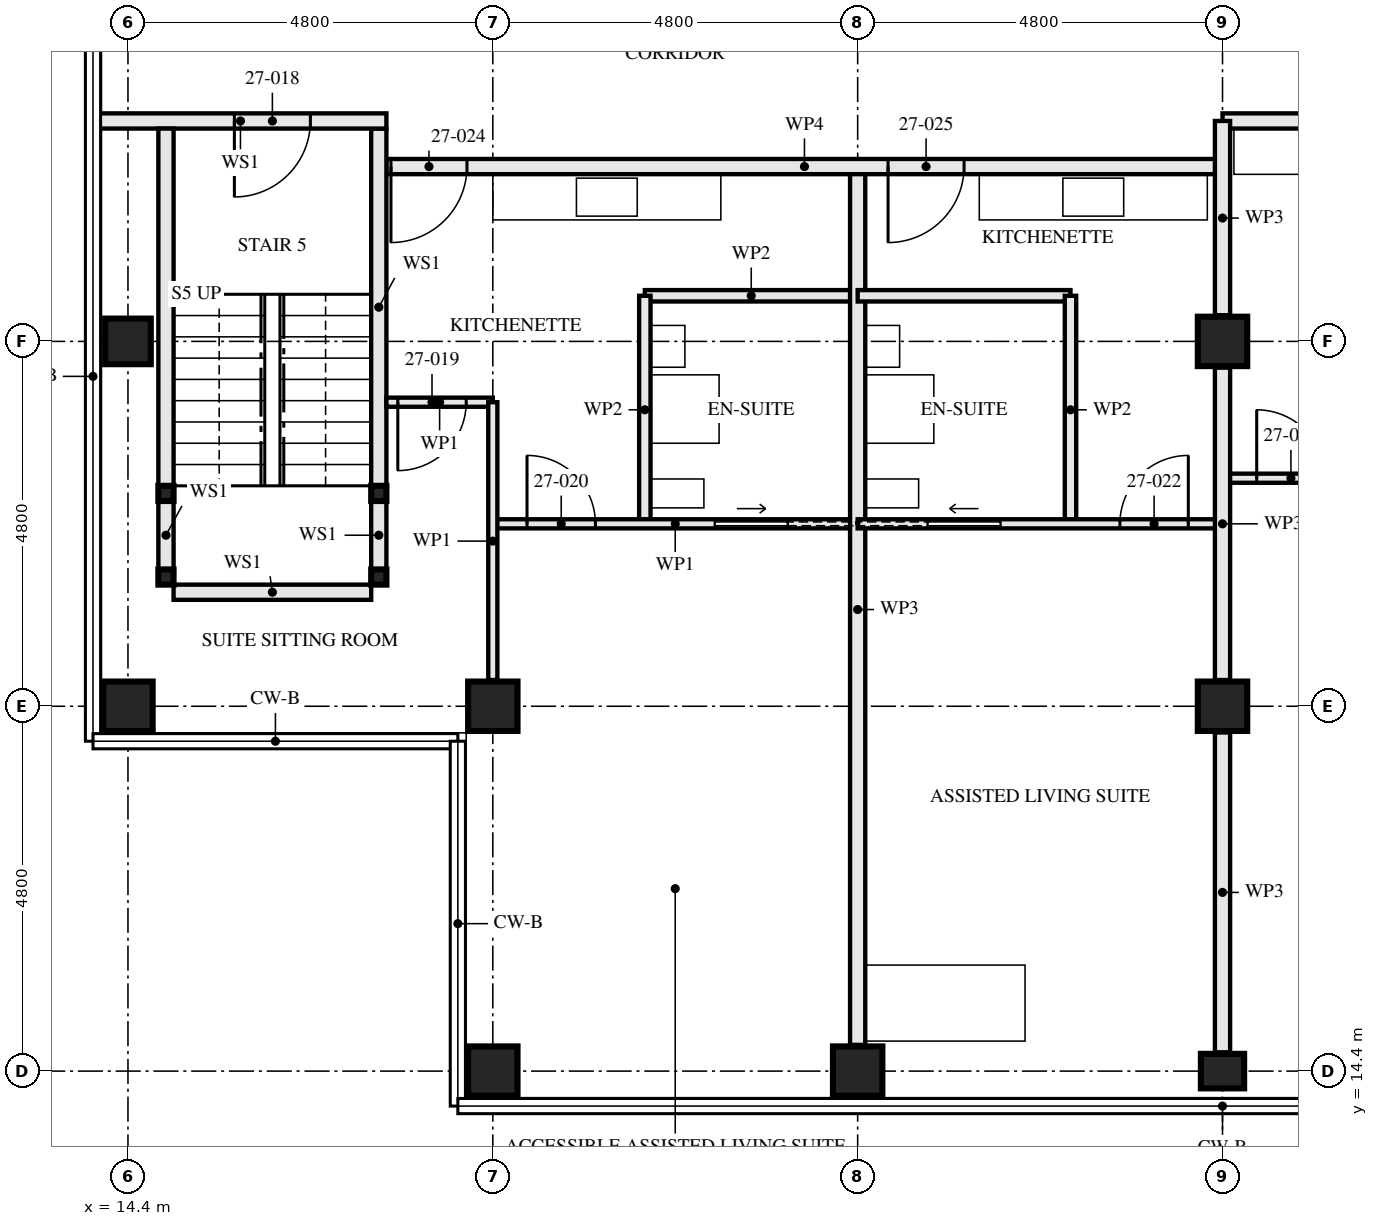
"""IFC4 building model, lengths in metres.
Left out: names, types, materials, properties, quantities, classifications, styles, units other than length and angle.
Written with IfcOpenShell. Run it as: python <this file> out.ifc"""

import sys

from ifc_helpers import new_model, si_unit, direction, frame, frame_2d, origin, origin_2d, place, context, subcontext, project, spatial, rectangle, hollow_rectangle, i_section, extrude, element, fill, save


model = new_model("IFC4")
c1 = context("Model", 3, precision=1e-05, world=origin(), true_north=direction((0.0, 1.0)))
c2 = subcontext(c1, "Body", "Model", "MODEL_VIEW")
j1 = project(units=[si_unit("LENGTHUNIT", "METRE"), si_unit("PLANEANGLEUNIT", "RADIAN")], contexts=[c1])
p1 = place(None, origin())
s1 = spatial("IfcSite", under=j1, at=p1, CompositionType="ELEMENT")
p2 = place(p1, origin())
s2 = spatial("IfcBuilding", under=s1, at=p2, CompositionType="ELEMENT")
p3 = place(p2, frame((0.0, 0.0, 101.5)))
s3 = spatial("IfcBuildingStorey", under=s2, at=p3, CompositionType="ELEMENT", Elevation=101.5)
p4 = place(p3, frame((14.4, 19.2, 0.0), z_axis=(0.0, 0.0, 1.0), x_axis=(0.0, 1.0, 0.0)))
e1 = element("IfcColumn", 1, at=p4, inside=s3, PredefinedType="COLUMN", context=c2, shape_type="SweptSolid", body=[
    extrude(hollow_rectangle(XDim=0.65, YDim=0.65, WallThickness=0.08, at=origin_2d()), origin(), (0.0, 0.0, 1.0), 3.5),
])
p5 = place(p3, frame((14.4, 24.0, 0.0), z_axis=(0.0, 0.0, 1.0), x_axis=(1.0, 0.0, 0.0)))
e2 = element("IfcColumn", 2, at=p5, inside=s3, PredefinedType="COLUMN", context=c2, shape_type="SweptSolid", body=[
    extrude(hollow_rectangle(XDim=0.6, YDim=0.6, WallThickness=0.08, at=origin_2d()), origin(), (0.0, 0.0, 1.0), 3.5),
])
for number, where, z_axis, x_axis in (
    (3, (19.2, 14.4, 0.0), (0.0, 0.0, 1.0), (0.0, 1.0, 0.0)),
    (4, (19.2, 19.2, 0.0), (0.0, 0.0, 1.0), (0.0, 1.0, 0.0)),
    (5, (24.0, 14.4, 0.0), (0.0, 0.0, 1.0), (0.0, 1.0, 0.0)),
):
    element("IfcColumn", number, at=place(p3, frame(where, z_axis=z_axis, x_axis=x_axis)), inside=s3, PredefinedType="COLUMN", context=c2, shape_type="SweptSolid", body=[
        extrude(hollow_rectangle(XDim=0.65, YDim=0.65, WallThickness=0.08, at=origin_2d()), origin(), (0.0, 0.0, 1.0), 3.5),
    ])
p6 = place(p3, frame((28.8, 14.4, 0.0), z_axis=(0.0, 0.0, 1.0), x_axis=(0.0, 1.0, 0.0)))
e6 = element("IfcColumn", 6, at=p6, inside=s3, PredefinedType="COLUMN", context=c2, shape_type="SweptSolid", body=[
    extrude(i_section(OverallWidth=0.454, OverallDepth=0.569, WebThickness=0.078, FlangeThickness=0.125, FilletRadius=0.015, at=origin_2d()), origin(), (0.0, 0.0, 1.0), 3.5),
])
for number, where, z_axis, x_axis in (
    (7, (28.8, 19.2, 0.0), (0.0, 0.0, 1.0), (1.0, 0.0, 0.0)),
    (8, (28.8, 24.0, 0.0), (0.0, 0.0, 1.0), (1.0, 0.0, 0.0)),
):
    element("IfcColumn", number, at=place(p3, frame(where, z_axis=z_axis, x_axis=x_axis)), inside=s3, PredefinedType="COLUMN", context=c2, shape_type="SweptSolid", body=[
        extrude(hollow_rectangle(XDim=0.65, YDim=0.65, WallThickness=0.05, at=origin_2d()), origin(), (0.0, 0.0, 1.0), 3.5),
    ])
for number, where, z_axis, x_axis in (
    (9, (14.9, 20.9, 0.0), (0.0, 0.0, 1.0), (1.0, 0.0, 0.0)),
    (10, (17.7, 20.9, 0.0), (0.0, 0.0, 1.0), (1.0, 0.0, 0.0)),
    (11, (14.9, 22.0, 0.0), (0.0, 0.0, 1.0), (1.0, 0.0, 0.0)),
    (12, (17.7, 22.0, 0.0), (0.0, 0.0, 1.0), (1.0, 0.0, 0.0)),
):
    element("IfcColumn", number, at=place(p3, frame(where, z_axis=z_axis, x_axis=x_axis)), inside=s3, PredefinedType="COLUMN", context=c2, shape_type="SweptSolid", body=[
        extrude(hollow_rectangle(XDim=0.2, YDim=0.2, WallThickness=0.008, at=origin_2d()), origin(), (0.0, 0.0, 1.0), 3.33),
    ])
p7 = place(p3, frame((14.9, 21.0, 0.0), z_axis=(0.0, 0.0, 1.0), x_axis=(0.0, 1.0, 0.0)))
e13 = element("IfcWall", 13, at=p7, inside=s3, PredefinedType="SOLIDWALL", context=c2, shape_type="SweptSolid", body=[
    extrude(rectangle(XDim=0.9, YDim=0.2, at=frame_2d((0.45, 0.0))), origin(), (0.0, 0.0, 1.0), 2.99),
])
p8 = place(p3, frame((14.9, 22.1, 0.0), z_axis=(0.0, 0.0, 1.0), x_axis=(0.0, 1.0, 0.0)))
e14 = element("IfcWall", 14, at=p8, inside=s3, PredefinedType="SOLIDWALL", context=c2, shape_type="SweptSolid", body=[
    extrude(rectangle(XDim=4.7, YDim=0.2, at=frame_2d((2.35, 0.0))), origin(), (0.0, 0.0, 1.0), 2.99),
])
p9 = place(p3, frame((17.7, 21.0, 0.0), z_axis=(0.0, 0.0, 1.0), x_axis=(0.0, 1.0, 0.0)))
e15 = element("IfcWall", 15, at=p9, inside=s3, PredefinedType="SOLIDWALL", context=c2, shape_type="SweptSolid", body=[
    extrude(rectangle(XDim=0.9, YDim=0.2, at=frame_2d((0.45, 0.0))), origin(), (0.0, 0.0, 1.0), 2.99),
])
p10 = place(p3, frame((17.7, 22.1, 0.0), z_axis=(0.0, 0.0, 1.0), x_axis=(0.0, 1.0, 0.0)))
e16 = element("IfcWall", 16, at=p10, inside=s3, PredefinedType="SOLIDWALL", context=c2, shape_type="SweptSolid", body=[
    extrude(rectangle(XDim=4.7, YDim=0.2, at=frame_2d((2.35, 0.0))), origin(), (0.0, 0.0, 1.0), 2.99),
])
p11 = place(p3, frame((15.0, 20.7, 0.0), z_axis=(0.0, 0.0, 1.0), x_axis=(1.0, 0.0, 0.0)))
e17 = element("IfcWall", 17, at=p11, inside=s3, PredefinedType="SOLIDWALL", context=c2, shape_type="SweptSolid", body=[
    extrude(rectangle(XDim=2.6, YDim=0.2, at=frame_2d((1.3, 0.0))), origin(), (0.0, 0.0, 1.0), 3.33),
])
p12 = place(p3, frame((13.96, 26.9, 0.0), z_axis=(0.0, 0.0, 1.0), x_axis=(1.0, 0.0, 0.0)))
e18 = element("IfcWall", 18, at=p12, inside=s3, PredefinedType="SOLIDWALL", context=c2, shape_type="SweptSolid", body=[
    extrude(rectangle(XDim=3.84, YDim=0.2, at=frame_2d((1.92, 0.0))), origin(), (0.0, 0.0, 1.0), 2.32),
])
p13 = place(p12, frame((1.84, 0.0, 0.0)))
e19 = element("IfcOpeningElement", 19, at=p13, cuts=e18, PredefinedType="OPENING", context=c2, shape_type="SweptSolid", body=[
    extrude(rectangle(XDim=1.0, YDim=2.1, at=frame_2d((0.5, 1.05))), frame((0.0, 0.111, 0.0), z_axis=(0.0, -1.0, 0.0), x_axis=(1.0, 0.0, 0.0)), (0.0, 0.0, 1.0), 0.221),
])
p14 = place(p3, frame((21.2, 21.6, 0.0), z_axis=(0.0, 0.0, 1.0), x_axis=(0.0, 1.0, 0.0)))
e20 = element("IfcWall", 20, at=p14, inside=s3, PredefinedType="PARTITIONING", context=c2, shape_type="SweptSolid", body=[
    extrude(rectangle(XDim=3.0, YDim=0.15, at=frame_2d((1.5, 0.0))), origin(), (0.0, 0.0, 1.0), 2.55),
])
p15 = place(p3, frame((21.2, 24.6, 0.0), z_axis=(0.0, 0.0, 1.0), x_axis=(1.0, 0.0, 0.0)))
e21 = element("IfcWall", 21, at=p15, inside=s3, PredefinedType="PARTITIONING", context=c2, shape_type="SweptSolid", body=[
    extrude(rectangle(XDim=2.8, YDim=0.15, at=frame_2d((1.4, 0.0))), origin(), (0.0, 0.0, 1.0), 3.33),
])
p16 = place(p3, frame((17.8, 23.2, 0.0), z_axis=(0.0, 0.0, 1.0), x_axis=(1.0, 0.0, 0.0)))
e22 = element("IfcWall", 22, at=p16, inside=s3, PredefinedType="PARTITIONING", context=c2, shape_type="SweptSolid", body=[
    extrude(rectangle(XDim=1.4, YDim=0.12, at=frame_2d((0.7, 0.0))), origin(), (0.0, 0.0, 1.0), 3.33),
])
p17 = place(p16, frame((0.15, 0.0, 0.0)))
e23 = element("IfcOpeningElement", 23, at=p17, cuts=e22, PredefinedType="OPENING", context=c2, shape_type="SweptSolid", body=[
    extrude(rectangle(XDim=0.9, YDim=2.1, at=frame_2d((0.45, 1.05))), frame((0.0, 0.071, 0.0), z_axis=(0.0, -1.0, 0.0), x_axis=(1.0, 0.0, 0.0)), (0.0, 0.0, 1.0), 0.141),
])
p18 = place(p3, frame((19.2, 21.6, 0.0), z_axis=(0.0, 0.0, 1.0), x_axis=(1.0, 0.0, 0.0)))
e24 = element("IfcWall", 24, at=p18, inside=s3, PredefinedType="PARTITIONING", context=c2, shape_type="SweptSolid", body=[
    extrude(rectangle(XDim=4.8, YDim=0.12, at=frame_2d((2.4, 0.0))), origin(), (0.0, 0.0, 1.0), 3.33),
])
p19 = place(p18, frame((0.45, 0.0, 0.0)))
e25 = element("IfcOpeningElement", 25, at=p19, cuts=e24, PredefinedType="OPENING", context=c2, shape_type="SweptSolid", body=[
    extrude(rectangle(XDim=0.9, YDim=2.1, at=frame_2d((0.45, 1.05))), frame((0.0, 0.071, 0.0), z_axis=(0.0, -1.0, 0.0), x_axis=(1.0, 0.0, 0.0)), (0.0, 0.0, 1.0), 0.141),
])
p20 = place(p18, frame((2.925, 0.0, 0.0)))
e26 = element("IfcOpeningElement", 26, at=p20, cuts=e24, PredefinedType="OPENING", context=c2, shape_type="SweptSolid", body=[
    extrude(rectangle(XDim=0.95, YDim=2.1, at=frame_2d((0.475, 1.05))), frame((0.0, 0.071, 0.0), z_axis=(0.0, -1.0, 0.0), x_axis=(1.0, 0.0, 0.0)), (0.0, 0.0, 1.0), 0.141),
])
p21 = place(p3, frame((19.2, 19.545, 0.0), z_axis=(0.0, 0.0, 1.0), x_axis=(0.0, 1.0, 0.0)))
e27 = element("IfcWall", 27, at=p21, inside=s3, PredefinedType="PARTITIONING", context=c2, shape_type="SweptSolid", body=[
    extrude(rectangle(XDim=3.655, YDim=0.12, at=frame_2d((1.828, 0.0))), origin(), (0.0, 0.0, 1.0), 2.55),
])
p22 = place(p3, frame((24.0, 14.745, 0.0), z_axis=(0.0, 0.0, 1.0), x_axis=(0.0, 1.0, 0.0)))
e28 = element("IfcWall", 28, at=p22, inside=s3, PredefinedType="PARTITIONING", context=c2, shape_type="SweptSolid", body=[
    extrude(rectangle(XDim=11.455, YDim=0.2, at=frame_2d((5.728, 0.0))), origin(), (0.0, 0.0, 1.0), 2.55),
])
p23 = place(p3, frame((26.8, 21.6, 0.0), z_axis=(0.0, 0.0, 1.0), x_axis=(0.0, 1.0, 0.0)))
e29 = element("IfcWall", 29, at=p23, inside=s3, PredefinedType="PARTITIONING", context=c2, shape_type="SweptSolid", body=[
    extrude(rectangle(XDim=3.0, YDim=0.15, at=frame_2d((1.5, 0.0))), origin(), (0.0, 0.0, 1.0), 2.55),
])
p24 = place(p3, frame((24.0, 24.6, 0.0), z_axis=(0.0, 0.0, 1.0), x_axis=(1.0, 0.0, 0.0)))
e30 = element("IfcWall", 30, at=p24, inside=s3, PredefinedType="PARTITIONING", context=c2, shape_type="SweptSolid", body=[
    extrude(rectangle(XDim=2.8, YDim=0.15, at=frame_2d((1.4, 0.0))), origin(), (0.0, 0.0, 1.0), 3.33),
])
p25 = place(p3, frame((24.0, 21.6, 0.0), z_axis=(0.0, 0.0, 1.0), x_axis=(1.0, 0.0, 0.0)))
e31 = element("IfcWall", 31, at=p25, inside=s3, PredefinedType="PARTITIONING", context=c2, shape_type="SweptSolid", body=[
    extrude(rectangle(XDim=4.8, YDim=0.12, at=frame_2d((2.4, 0.0))), origin(), (0.0, 0.0, 1.0), 3.33),
])
p26 = place(p25, frame((3.45, 0.0, 0.0)))
e32 = element("IfcOpeningElement", 32, at=p26, cuts=e31, PredefinedType="OPENING", context=c2, shape_type="SweptSolid", body=[
    extrude(rectangle(XDim=0.9, YDim=2.1, at=frame_2d((0.45, 1.05))), frame((0.0, 0.071, 0.0), z_axis=(0.0, -1.0, 0.0), x_axis=(1.0, 0.0, 0.0)), (0.0, 0.0, 1.0), 0.141),
])
p27 = place(p25, frame((0.925, 0.0, 0.0)))
e33 = element("IfcOpeningElement", 33, at=p27, cuts=e31, PredefinedType="OPENING", context=c2, shape_type="SweptSolid", body=[
    extrude(rectangle(XDim=0.95, YDim=2.1, at=frame_2d((0.475, 1.05))), frame((0.0, 0.071, 0.0), z_axis=(0.0, -1.0, 0.0), x_axis=(1.0, 0.0, 0.0)), (0.0, 0.0, 1.0), 0.141),
])
p28 = place(p3, frame((17.8, 26.3, 0.0), z_axis=(0.0, 0.0, 1.0), x_axis=(1.0, 0.0, 0.0)))
e34 = element("IfcWall", 34, at=p28, inside=s3, PredefinedType="PARTITIONING", context=c2, shape_type="SweptSolid", body=[
    extrude(rectangle(XDim=11.0, YDim=0.2, at=frame_2d((5.5, 0.0))), origin(), (0.0, 0.0, 1.0), 2.55),
])
p29 = place(p28, frame((0.06, 0.0, 0.0)))
e35 = element("IfcOpeningElement", 35, at=p29, cuts=e34, PredefinedType="OPENING", context=c2, shape_type="SweptSolid", body=[
    extrude(rectangle(XDim=1.0, YDim=2.1, at=frame_2d((0.5, 1.05))), frame((0.0, 0.111, 0.0), z_axis=(0.0, -1.0, 0.0), x_axis=(1.0, 0.0, 0.0)), (0.0, 0.0, 1.0), 0.221),
])
p30 = place(p28, frame((6.6, 0.0, 0.0)))
e36 = element("IfcOpeningElement", 36, at=p30, cuts=e34, PredefinedType="OPENING", context=c2, shape_type="SweptSolid", body=[
    extrude(rectangle(XDim=1.0, YDim=2.1, at=frame_2d((0.5, 1.05))), frame((0.0, 0.111, 0.0), z_axis=(0.0, -1.0, 0.0), x_axis=(1.0, 0.0, 0.0)), (0.0, 0.0, 1.0), 0.221),
])
p31 = place(p3, frame((28.8, 22.2, 0.0), z_axis=(0.0, 0.0, 1.0), x_axis=(1.0, 0.0, 0.0)))
e37 = element("IfcWall", 37, at=p31, inside=s3, PredefinedType="PARTITIONING", context=c2, shape_type="SweptSolid", body=[
    extrude(rectangle(XDim=4.8, YDim=0.12, at=frame_2d((2.4, 0.0))), origin(), (0.0, 0.0, 1.0), 3.33),
])
p32 = place(p31, frame((0.45, 0.0, 0.0)))
e38 = element("IfcOpeningElement", 38, at=p32, cuts=e37, PredefinedType="OPENING", context=c2, shape_type="SweptSolid", body=[
    extrude(rectangle(XDim=0.9, YDim=2.1, at=frame_2d((0.45, 1.05))), frame((0.0, 0.071, 0.0), z_axis=(0.0, -1.0, 0.0), x_axis=(1.0, 0.0, 0.0)), (0.0, 0.0, 1.0), 0.141),
])
p33 = place(p3, frame((28.8, 26.9, 0.0), z_axis=(0.0, 0.0, 1.0), x_axis=(1.0, 0.0, 0.0)))
e39 = element("IfcWall", 39, at=p33, inside=s3, PredefinedType="PARTITIONING", context=c2, shape_type="SweptSolid", body=[
    extrude(rectangle(XDim=9.6, YDim=0.2, at=frame_2d((4.8, 0.0))), origin(), (0.0, 0.0, 1.0), 3.33),
])
p34 = place(p33, frame((5.2, 0.0, 0.0)))
e40 = element("IfcOpeningElement", 40, at=p34, cuts=e39, PredefinedType="OPENING", context=c2, shape_type="SweptSolid", body=[
    extrude(rectangle(XDim=1.0, YDim=2.1, at=frame_2d((0.5, 1.05))), frame((0.0, 0.111, 0.0), z_axis=(0.0, -1.0, 0.0), x_axis=(1.0, 0.0, 0.0)), (0.0, 0.0, 1.0), 0.221),
])
p35 = place(p3, frame((28.8, 14.647, 0.0), z_axis=(0.0, 0.0, 1.0), x_axis=(0.0, 1.0, 0.0)))
e41 = element("IfcWall", 41, at=p35, inside=s3, PredefinedType="PARTITIONING", context=c2, shape_type="SweptSolid", body=[
    extrude(rectangle(XDim=4.208, YDim=0.2, at=frame_2d((2.104, 0.0))), origin(), (0.0, 0.0, 1.0), 2.32),
])
p36 = place(p3, frame((28.8, 19.545, 0.0), z_axis=(0.0, 0.0, 1.0), x_axis=(0.0, 1.0, 0.0)))
e42 = element("IfcWall", 42, at=p36, inside=s3, PredefinedType="PARTITIONING", context=c2, shape_type="SweptSolid", body=[
    extrude(rectangle(XDim=4.11, YDim=0.2, at=frame_2d((2.055, 0.0))), origin(), (0.0, 0.0, 1.0), 2.32),
])
p37 = place(p3, frame((28.8, 24.345, 0.0), z_axis=(0.0, 0.0, 1.0), x_axis=(0.0, 1.0, 0.0)))
e43 = element("IfcWall", 43, at=p37, inside=s3, PredefinedType="PARTITIONING", context=c2, shape_type="SweptSolid", body=[
    extrude(rectangle(XDim=2.555, YDim=0.2, at=frame_2d((1.277, 0.0))), origin(), (0.0, 0.0, 1.0), 2.32),
])
p38 = place(p13, frame((1.0, 0.0, 0.0), z_axis=(0.0, 0.0, 1.0), x_axis=(-1.0, 0.0, 0.0)))
e44 = element("IfcDoor", 44, at=p38, inside=s3, OperationType="SINGLE_SWING_LEFT", PredefinedType="DOOR", context=c2, shape_type="SweptSolid", body=[
    extrude(rectangle(XDim=1.0, YDim=2.1, at=frame_2d((0.5, 1.05))), frame((0.0, 0.032, 0.0), z_axis=(0.0, -1.0, 0.0), x_axis=(1.0, 0.0, 0.0)), (0.0, 0.0, 1.0), 0.064),
])
fill(e19, e44)
p39 = place(p17, frame((0.9, 0.0, 0.0), z_axis=(0.0, 0.0, 1.0), x_axis=(-1.0, 0.0, 0.0)))
e45 = element("IfcDoor", 45, at=p39, inside=s3, OperationType="SINGLE_SWING_LEFT", PredefinedType="DOOR", context=c2, shape_type="SweptSolid", body=[
    extrude(rectangle(XDim=0.9, YDim=2.1, at=frame_2d((0.45, 1.05))), frame((0.0, 0.022, 0.0), z_axis=(0.0, -1.0, 0.0), x_axis=(1.0, 0.0, 0.0)), (0.0, 0.0, 1.0), 0.044),
])
fill(e23, e45)
p40 = place(p19, origin())
e46 = element("IfcDoor", 46, at=p40, inside=s3, OperationType="SINGLE_SWING_RIGHT", PredefinedType="DOOR", context=c2, shape_type="SweptSolid", body=[
    extrude(rectangle(XDim=0.9, YDim=2.1, at=frame_2d((0.45, 1.05))), frame((0.0, 0.022, 0.0), z_axis=(0.0, -1.0, 0.0), x_axis=(1.0, 0.0, 0.0)), (0.0, 0.0, 1.0), 0.044),
])
fill(e25, e46)
p41 = place(p20, origin())
e47 = element("IfcDoor", 47, at=p41, inside=s3, OperationType="SLIDING_TO_LEFT", PredefinedType="DOOR", context=c2, shape_type="SweptSolid", body=[
    extrude(rectangle(XDim=0.95, YDim=2.1, at=frame_2d((0.475, 1.05))), frame((0.0, 0.022, 0.0), z_axis=(0.0, -1.0, 0.0), x_axis=(1.0, 0.0, 0.0)), (0.0, 0.0, 1.0), 0.044),
])
fill(e26, e47)
p42 = place(p26, origin())
e48 = element("IfcDoor", 48, at=p42, inside=s3, OperationType="SINGLE_SWING_LEFT", PredefinedType="DOOR", context=c2, shape_type="SweptSolid", body=[
    extrude(rectangle(XDim=0.9, YDim=2.1, at=frame_2d((0.45, 1.05))), frame((0.0, 0.022, 0.0), z_axis=(0.0, -1.0, 0.0), x_axis=(1.0, 0.0, 0.0)), (0.0, 0.0, 1.0), 0.044),
])
fill(e32, e48)
p43 = place(p27, origin())
e49 = element("IfcDoor", 49, at=p43, inside=s3, OperationType="SLIDING_TO_RIGHT", PredefinedType="DOOR", context=c2, shape_type="SweptSolid", body=[
    extrude(rectangle(XDim=0.95, YDim=2.1, at=frame_2d((0.475, 1.05))), frame((0.0, 0.022, 0.0), z_axis=(0.0, -1.0, 0.0), x_axis=(1.0, 0.0, 0.0)), (0.0, 0.0, 1.0), 0.044),
])
fill(e33, e49)
p44 = place(p29, frame((1.0, 0.0, 0.0), z_axis=(0.0, 0.0, 1.0), x_axis=(-1.0, 0.0, 0.0)))
e50 = element("IfcDoor", 50, at=p44, inside=s3, OperationType="SINGLE_SWING_LEFT", PredefinedType="DOOR", context=c2, shape_type="SweptSolid", body=[
    extrude(rectangle(XDim=1.0, YDim=2.1, at=frame_2d((0.5, 1.05))), frame((0.0, 0.027, 0.0), z_axis=(0.0, -1.0, 0.0), x_axis=(1.0, 0.0, 0.0)), (0.0, 0.0, 1.0), 0.054),
])
fill(e35, e50)
p45 = place(p30, frame((1.0, 0.0, 0.0), z_axis=(0.0, 0.0, 1.0), x_axis=(-1.0, 0.0, 0.0)))
e51 = element("IfcDoor", 51, at=p45, inside=s3, OperationType="SINGLE_SWING_LEFT", PredefinedType="DOOR", context=c2, shape_type="SweptSolid", body=[
    extrude(rectangle(XDim=1.0, YDim=2.1, at=frame_2d((0.5, 1.05))), frame((0.0, 0.027, 0.0), z_axis=(0.0, -1.0, 0.0), x_axis=(1.0, 0.0, 0.0)), (0.0, 0.0, 1.0), 0.054),
])
fill(e36, e51)
p46 = place(p32, origin())
e52 = element("IfcDoor", 52, at=p46, inside=s3, OperationType="SINGLE_SWING_RIGHT", PredefinedType="DOOR", context=c2, shape_type="SweptSolid", body=[
    extrude(rectangle(XDim=0.9, YDim=2.1, at=frame_2d((0.45, 1.05))), frame((0.0, 0.022, 0.0), z_axis=(0.0, -1.0, 0.0), x_axis=(1.0, 0.0, 0.0)), (0.0, 0.0, 1.0), 0.044),
])
fill(e38, e52)
save(model, sys.argv[1])
